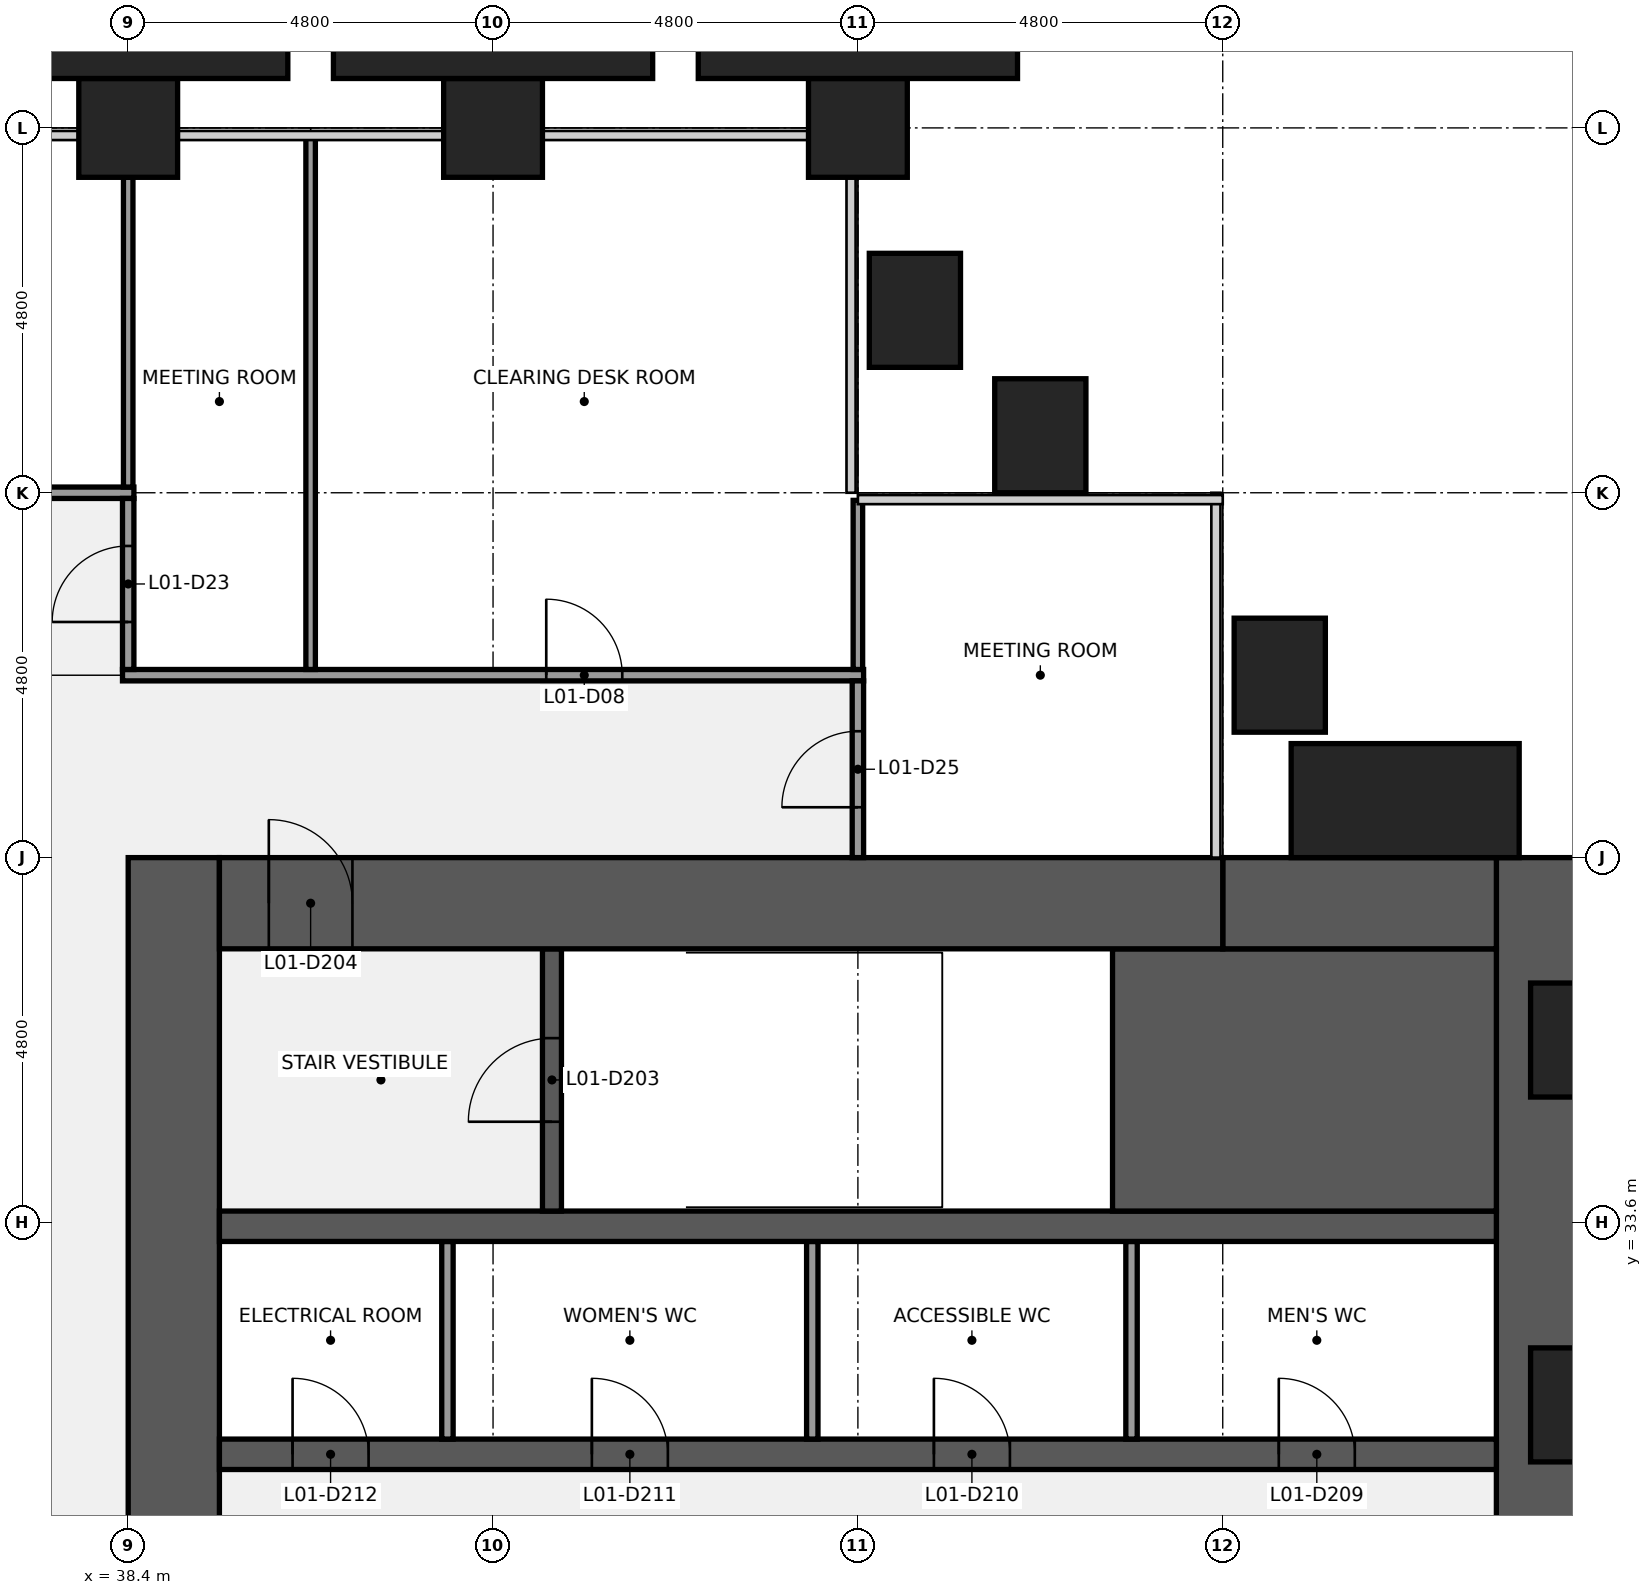
"""IFC4 building model, lengths in metres.
Left out: names, types, materials, properties, quantities, classifications, styles, units other than length and angle.
Written with IfcOpenShell. Run it as: python <this file> out.ifc"""

import sys

from ifc_helpers import new_model, si_unit, direction, frame, frame_2d, origin, origin_2d, place, context, subcontext, project, spatial, rectangle, extrude, element, fill, save


model = new_model("IFC4")
c1 = context("Model", 3, precision=1e-05, world=origin(), true_north=direction((0.0, 1.0)))
c2 = subcontext(c1, "Body", "Model", "MODEL_VIEW")
j1 = project(units=[si_unit("LENGTHUNIT", "METRE"), si_unit("PLANEANGLEUNIT", "RADIAN")], contexts=[c1])
p1 = place(None, origin())
s1 = spatial("IfcSite", under=j1, at=p1, CompositionType="ELEMENT")
p2 = place(p1, origin())
s2 = spatial("IfcBuilding", under=s1, at=p2, CompositionType="ELEMENT")
p3 = place(p2, frame((0.0, 0.0, 12.6)))
s3 = spatial("IfcBuildingStorey", under=s2, at=p3, CompositionType="ELEMENT", Elevation=12.6)
for number, where, z_axis, x_axis in (
    (1, (38.4, 48.0, 0.0), (0.0, 0.0, 1.0), (1.0, 0.0, 0.0)),
    (2, (43.2, 48.0, 0.0), (0.0, 0.0, 1.0), (1.0, 0.0, 0.0)),
    (3, (48.0, 48.0, 0.0), (0.0, 0.0, 1.0), (1.0, 0.0, 0.0)),
):
    element("IfcColumn", number, at=place(p3, frame(where, z_axis=z_axis, x_axis=x_axis)), inside=s3, PredefinedType="COLUMN", context=c2, shape_type="SweptSolid", body=[
        extrude(rectangle(XDim=1.3, YDim=1.3, at=origin_2d()), origin(), (0.0, 0.0, 1.0), 4.4),
    ])
p4 = place(p3, frame((57.0, 38.4, 0.0), z_axis=(0.0, 0.0, 1.0), x_axis=(0.0, -1.0, 0.0)))
e4 = element("IfcWall", 4, at=p4, inside=s3, PredefinedType="SHEAR", context=c2, shape_type="SweptSolid", body=[
    extrude(rectangle(XDim=28.8, YDim=1.2, at=frame_2d((14.4, 0.0))), origin(), (0.0, 0.0, 1.0), 4.24),
])
p5 = place(p4, frame((18.45, 0.0, 0.9)))
e5 = element("IfcOpeningElement", 5, at=p5, cuts=e4, PredefinedType="OPENING", context=c2, shape_type="SweptSolid", body=[
    extrude(rectangle(XDim=1.5, YDim=1.5, at=frame_2d((0.75, 0.75))), frame((0.0, 0.61, 0.0), z_axis=(0.0, -1.0, 0.0), x_axis=(1.0, 0.0, 0.0)), (0.0, 0.0, 1.0), 1.22),
])
p6 = place(p4, frame((8.85, 0.0, 0.9)))
e6 = element("IfcOpeningElement", 6, at=p6, cuts=e4, PredefinedType="OPENING", context=c2, shape_type="SweptSolid", body=[
    extrude(rectangle(XDim=1.5, YDim=1.5, at=frame_2d((0.75, 0.75))), frame((0.0, 0.61, 0.0), z_axis=(0.0, -1.0, 0.0), x_axis=(1.0, 0.0, 0.0)), (0.0, 0.0, 1.0), 1.22),
])
p7 = place(p3, frame((39.0, 9.6, 0.0), z_axis=(0.0, 0.0, 1.0), x_axis=(0.0, 1.0, 0.0)))
e7 = element("IfcWall", 7, at=p7, inside=s3, PredefinedType="SHEAR", context=c2, shape_type="SweptSolid", body=[
    extrude(rectangle(XDim=28.8, YDim=1.2, at=frame_2d((14.4, 0.0))), origin(), (0.0, 0.0, 1.0), 4.24),
])
p8 = place(p7, frame((8.7, 0.0, 0.0)))
e8 = element("IfcOpeningElement", 8, at=p8, cuts=e7, PredefinedType="OPENING", context=c2, shape_type="SweptSolid", body=[
    extrude(rectangle(XDim=1.8, YDim=2.1, at=frame_2d((0.9, 1.05))), frame((0.0, 0.61, 0.0), z_axis=(0.0, -1.0, 0.0), x_axis=(1.0, 0.0, 0.0)), (0.0, 0.0, 1.0), 1.22),
])
p9 = place(p7, frame((18.3, 0.0, 0.0)))
e9 = element("IfcOpeningElement", 9, at=p9, cuts=e7, PredefinedType="OPENING", context=c2, shape_type="SweptSolid", body=[
    extrude(rectangle(XDim=1.8, YDim=2.1, at=frame_2d((0.9, 1.05))), frame((0.0, 0.61, 0.0), z_axis=(0.0, -1.0, 0.0), x_axis=(1.0, 0.0, 0.0)), (0.0, 0.0, 1.0), 1.22),
])
p10 = place(p3, frame((39.6, 30.55, 0.0), z_axis=(0.0, 0.0, 1.0), x_axis=(1.0, 0.0, 0.0)))
e10 = element("IfcWall", 10, at=p10, inside=s3, PredefinedType="SHEAR", context=c2, shape_type="SweptSolid", body=[
    extrude(rectangle(XDim=16.8, YDim=0.4, at=frame_2d((8.4, 0.0))), origin(), (0.0, 0.0, 1.0), 4.24),
])
p11 = place(p10, frame((13.938, 0.0, 0.0)))
e11 = element("IfcOpeningElement", 11, at=p11, cuts=e10, PredefinedType="OPENING", context=c2, shape_type="SweptSolid", body=[
    extrude(rectangle(XDim=1.0, YDim=2.1, at=frame_2d((0.5, 1.05))), frame((0.0, 0.21, 0.0), z_axis=(0.0, -1.0, 0.0), x_axis=(1.0, 0.0, 0.0)), (0.0, 0.0, 1.0), 0.42),
])
p12 = place(p10, frame((9.4, 0.0, 0.0)))
e12 = element("IfcOpeningElement", 12, at=p12, cuts=e10, PredefinedType="OPENING", context=c2, shape_type="SweptSolid", body=[
    extrude(rectangle(XDim=1.0, YDim=2.1, at=frame_2d((0.5, 1.05))), frame((0.0, 0.21, 0.0), z_axis=(0.0, -1.0, 0.0), x_axis=(1.0, 0.0, 0.0)), (0.0, 0.0, 1.0), 0.42),
])
p13 = place(p10, frame((4.9, 0.0, 0.0)))
e13 = element("IfcOpeningElement", 13, at=p13, cuts=e10, PredefinedType="OPENING", context=c2, shape_type="SweptSolid", body=[
    extrude(rectangle(XDim=1.0, YDim=2.1, at=frame_2d((0.5, 1.05))), frame((0.0, 0.21, 0.0), z_axis=(0.0, -1.0, 0.0), x_axis=(1.0, 0.0, 0.0)), (0.0, 0.0, 1.0), 0.42),
])
p14 = place(p10, frame((0.962, 0.0, 0.0)))
e14 = element("IfcOpeningElement", 14, at=p14, cuts=e10, PredefinedType="OPENING", context=c2, shape_type="SweptSolid", body=[
    extrude(rectangle(XDim=1.0, YDim=2.1, at=frame_2d((0.5, 1.05))), frame((0.0, 0.21, 0.0), z_axis=(0.0, -1.0, 0.0), x_axis=(1.0, 0.0, 0.0)), (0.0, 0.0, 1.0), 0.42),
])
for number, where, z_axis, x_axis in (
    (15, (51.6, 30.75, 0.0), (0.0, 0.0, 1.0), (0.0, 1.0, 0.0)),
    (16, (47.4, 30.75, 0.0), (0.0, 0.0, 1.0), (0.0, 1.0, 0.0)),
    (17, (42.6, 30.75, 0.0), (0.0, 0.0, 1.0), (0.0, 1.0, 0.0)),
):
    element("IfcWall", number, at=place(p3, frame(where, z_axis=z_axis, x_axis=x_axis)), inside=s3, PredefinedType="PARTITIONING", context=c2, shape_type="SweptSolid", body=[
        extrude(rectangle(XDim=2.6, YDim=0.15, at=frame_2d((1.3, 0.0))), origin(), (0.0, 0.0, 1.0), 4.24),
    ])
p15 = place(p3, frame((39.6, 33.55, 0.0), z_axis=(0.0, 0.0, 1.0), x_axis=(1.0, 0.0, 0.0)))
e18 = element("IfcWall", 18, at=p15, inside=s3, PredefinedType="SHEAR", context=c2, shape_type="SweptSolid", body=[
    extrude(rectangle(XDim=16.8, YDim=0.4, at=frame_2d((8.4, 0.0))), origin(), (0.0, 0.0, 1.0), 4.24),
])
p16 = place(p3, frame((51.35, 35.475, 0.0), z_axis=(0.0, 0.0, 1.0), x_axis=(1.0, 0.0, 0.0)))
e19 = element("IfcWall", 19, at=p16, inside=s3, PredefinedType="SHEAR", context=c2, shape_type="SweptSolid", body=[
    extrude(rectangle(XDim=5.05, YDim=3.45, at=frame_2d((2.525, 0.0))), origin(), (0.0, 0.0, 1.0), 4.24),
])
p17 = place(p3, frame((43.975, 33.75, 0.0), z_axis=(0.0, 0.0, 1.0), x_axis=(0.0, 1.0, 0.0)))
e20 = element("IfcWall", 20, at=p17, inside=s3, PredefinedType="SHEAR", context=c2, shape_type="SweptSolid", body=[
    extrude(rectangle(XDim=3.45, YDim=0.25, at=frame_2d((1.725, 0.0))), origin(), (0.0, 0.0, 1.0), 4.24),
])
p18 = place(p17, frame((1.175, 0.0, 0.0)))
e21 = element("IfcOpeningElement", 21, at=p18, cuts=e20, PredefinedType="OPENING", context=c2, shape_type="SweptSolid", body=[
    extrude(rectangle(XDim=1.1, YDim=2.1, at=frame_2d((0.55, 1.05))), frame((0.0, 0.135, 0.0), z_axis=(0.0, -1.0, 0.0), x_axis=(1.0, 0.0, 0.0)), (0.0, 0.0, 1.0), 0.27),
])
p19 = place(p3, frame((52.8, 37.8, 0.0), z_axis=(0.0, 0.0, 1.0), x_axis=(1.0, 0.0, 0.0)))
e22 = element("IfcWall", 22, at=p19, inside=s3, PredefinedType="SHEAR", context=c2, shape_type="SweptSolid", body=[
    extrude(rectangle(XDim=3.6, YDim=1.2, at=frame_2d((1.8, 0.0))), origin(), (0.0, 0.0, 1.0), 4.24),
])
p20 = place(p3, frame((39.6, 37.8, 0.0), z_axis=(0.0, 0.0, 1.0), x_axis=(1.0, 0.0, 0.0)))
e23 = element("IfcWall", 23, at=p20, inside=s3, PredefinedType="SHEAR", context=c2, shape_type="SweptSolid", body=[
    extrude(rectangle(XDim=13.2, YDim=1.2, at=frame_2d((6.6, 0.0))), origin(), (0.0, 0.0, 1.0), 4.24),
])
p21 = place(p20, frame((0.65, 0.0, 0.0)))
e24 = element("IfcOpeningElement", 24, at=p21, cuts=e23, PredefinedType="OPENING", context=c2, shape_type="SweptSolid", body=[
    extrude(rectangle(XDim=1.1, YDim=2.1, at=frame_2d((0.55, 1.05))), frame((0.0, 0.61, 0.0), z_axis=(0.0, -1.0, 0.0), x_axis=(1.0, 0.0, 0.0)), (0.0, 0.0, 1.0), 1.22),
])
p22 = place(p3, frame((38.325, 40.8, 0.0), z_axis=(0.0, 0.0, 1.0), x_axis=(1.0, 0.0, 0.0)))
e25 = element("IfcWall", 25, at=p22, inside=s3, PredefinedType="PARTITIONING", context=c2, shape_type="SweptSolid", body=[
    extrude(rectangle(XDim=9.75, YDim=0.15, at=frame_2d((4.875, 0.0))), origin(), (0.0, 0.0, 1.0), 3.27),
])
p23 = place(p22, frame((5.575, 0.0, 0.0)))
e26 = element("IfcOpeningElement", 26, at=p23, cuts=e25, PredefinedType="OPENING", context=c2, shape_type="SweptSolid", body=[
    extrude(rectangle(XDim=1.0, YDim=2.1, at=frame_2d((0.5, 1.05))), frame((0.0, 0.085, 0.0), z_axis=(0.0, -1.0, 0.0), x_axis=(1.0, 0.0, 0.0)), (0.0, 0.0, 1.0), 0.17),
])
p24 = place(p3, frame((19.125, 43.2, 0.0), z_axis=(0.0, 0.0, 1.0), x_axis=(1.0, 0.0, 0.0)))
e27 = element("IfcWall", 27, at=p24, inside=s3, PredefinedType="PARTITIONING", context=c2, shape_type="SweptSolid", body=[
    extrude(rectangle(XDim=19.35, YDim=0.15, at=frame_2d((9.675, 0.0))), origin(), (0.0, 0.0, 1.0), 3.27),
])
p25 = place(p24, frame((1.975, 0.0, 0.0)))
e28 = element("IfcOpeningElement", 28, at=p25, cuts=e27, PredefinedType="OPENING", context=c2, shape_type="SweptSolid", body=[
    extrude(rectangle(XDim=1.0, YDim=2.1, at=frame_2d((0.5, 1.05))), frame((0.0, 0.085, 0.0), z_axis=(0.0, -1.0, 0.0), x_axis=(1.0, 0.0, 0.0)), (0.0, 0.0, 1.0), 0.17),
])
p26 = place(p24, frame((6.775, 0.0, 0.0)))
e29 = element("IfcOpeningElement", 29, at=p26, cuts=e27, PredefinedType="OPENING", context=c2, shape_type="SweptSolid", body=[
    extrude(rectangle(XDim=1.0, YDim=2.1, at=frame_2d((0.5, 1.05))), frame((0.0, 0.085, 0.0), z_axis=(0.0, -1.0, 0.0), x_axis=(1.0, 0.0, 0.0)), (0.0, 0.0, 1.0), 0.17),
])
p27 = place(p24, frame((13.975, 0.0, 0.0)))
e30 = element("IfcOpeningElement", 30, at=p27, cuts=e27, PredefinedType="OPENING", context=c2, shape_type="SweptSolid", body=[
    extrude(rectangle(XDim=1.0, YDim=2.1, at=frame_2d((0.5, 1.05))), frame((0.0, 0.085, 0.0), z_axis=(0.0, -1.0, 0.0), x_axis=(1.0, 0.0, 0.0)), (0.0, 0.0, 1.0), 0.17),
])
p28 = place(p3, frame((38.4, 43.275, 0.0), z_axis=(0.0, 0.0, 1.0), x_axis=(0.0, 1.0, 0.0)))
e31 = element("IfcWall", 31, at=p28, inside=s3, PredefinedType="PARTITIONING", context=c2, shape_type="SweptSolid", body=[
    extrude(rectangle(XDim=4.075, YDim=0.125, at=frame_2d((2.038, 0.0))), origin(), (0.0, 0.0, 1.0), 3.27),
])
p29 = place(p3, frame((38.4, 40.875, 0.0), z_axis=(0.0, 0.0, 1.0), x_axis=(0.0, 1.0, 0.0)))
e32 = element("IfcWall", 32, at=p29, inside=s3, PredefinedType="PARTITIONING", context=c2, shape_type="SweptSolid", body=[
    extrude(rectangle(XDim=2.25, YDim=0.15, at=frame_2d((1.125, 0.0))), origin(), (0.0, 0.0, 1.0), 3.27),
])
p30 = place(p29, frame((0.625, 0.0, 0.0)))
e33 = element("IfcOpeningElement", 33, at=p30, cuts=e32, PredefinedType="OPENING", context=c2, shape_type="SweptSolid", body=[
    extrude(rectangle(XDim=1.0, YDim=2.1, at=frame_2d((0.5, 1.05))), frame((0.0, 0.085, 0.0), z_axis=(0.0, -1.0, 0.0), x_axis=(1.0, 0.0, 0.0)), (0.0, 0.0, 1.0), 0.17),
])
p31 = place(p3, frame((40.8, 40.875, 0.0), z_axis=(0.0, 0.0, 1.0), x_axis=(0.0, 1.0, 0.0)))
e34 = element("IfcWall", 34, at=p31, inside=s3, PredefinedType="PARTITIONING", context=c2, shape_type="SweptSolid", body=[
    extrude(rectangle(XDim=7.025, YDim=0.125, at=frame_2d((3.512, 0.0))), origin(), (0.0, 0.0, 1.0), 3.27),
])
p32 = place(p3, frame((48.0, 40.875, 0.0), z_axis=(0.0, 0.0, 1.0), x_axis=(0.0, 1.0, 0.0)))
e35 = element("IfcWall", 35, at=p32, inside=s3, PredefinedType="PARTITIONING", context=c2, shape_type="SweptSolid", body=[
    extrude(rectangle(XDim=2.225, YDim=0.125, at=frame_2d((1.113, 0.0))), origin(), (0.0, 0.0, 1.0), 3.27),
])
p33 = place(p3, frame((48.0, 38.4, 0.0), z_axis=(0.0, 0.0, 1.0), x_axis=(0.0, 1.0, 0.0)))
e36 = element("IfcWall", 36, at=p33, inside=s3, PredefinedType="PARTITIONING", context=c2, shape_type="SweptSolid", body=[
    extrude(rectangle(XDim=2.325, YDim=0.15, at=frame_2d((1.163, 0.0))), origin(), (0.0, 0.0, 1.0), 3.27),
])
p34 = place(p33, frame((0.663, 0.0, 0.0)))
e37 = element("IfcOpeningElement", 37, at=p34, cuts=e36, PredefinedType="OPENING", context=c2, shape_type="SweptSolid", body=[
    extrude(rectangle(XDim=1.0, YDim=2.1, at=frame_2d((0.5, 1.05))), frame((0.0, 0.085, 0.0), z_axis=(0.0, -1.0, 0.0), x_axis=(1.0, 0.0, 0.0)), (0.0, 0.0, 1.0), 0.17),
])
for number, where, z_axis, x_axis in (
    (38, (53.55, 40.8, 0.0), (0.0, 0.0, 1.0), (0.0, 1.0, 0.0)),
    (39, (50.4, 43.95, 0.0), (0.0, 0.0, 1.0), (1.0, 0.0, 0.0)),
    (40, (48.75, 45.6, 0.0), (0.0, 0.0, 1.0), (0.0, 1.0, 0.0)),
):
    element("IfcColumn", number, at=place(p3, frame(where, z_axis=z_axis, x_axis=x_axis)), inside=s3, PredefinedType="PILASTER", context=c2, shape_type="SweptSolid", body=[
        extrude(rectangle(XDim=1.2, YDim=1.5, at=origin_2d()), origin(), (0.0, 0.0, 1.0), 4.4),
    ])
p35 = place(p3, frame((55.2, 39.15, 0.0), z_axis=(0.0, 0.0, 1.0), x_axis=(1.0, 0.0, 0.0)))
e41 = element("IfcColumn", 41, at=p35, inside=s3, PredefinedType="PILASTER", context=c2, shape_type="SweptSolid", body=[
    extrude(rectangle(XDim=3.0, YDim=1.5, at=origin_2d()), origin(), (0.0, 0.0, 1.0), 4.4),
])
for number, where, z_axis, x_axis in (
    (42, (38.4, 49.075, 0.0), (0.0, 0.0, 1.0), (1.0, 0.0, 0.0)),
    (43, (43.2, 49.075, 0.0), (0.0, 0.0, 1.0), (1.0, 0.0, 0.0)),
    (44, (48.0, 49.075, 0.0), (0.0, 0.0, 1.0), (1.0, 0.0, 0.0)),
):
    element("IfcColumn", number, at=place(p3, frame(where, z_axis=z_axis, x_axis=x_axis)), inside=s3, PredefinedType="PILASTER", context=c2, shape_type="SweptSolid", body=[
        extrude(rectangle(XDim=4.2, YDim=0.85, at=origin_2d()), origin(), (0.0, 0.0, 1.0), 4.4),
    ])
p36 = place(p18, origin())
e45 = element("IfcDoor", 45, at=p36, inside=s3, OperationType="SINGLE_SWING_LEFT", PredefinedType="DOOR", context=c2, shape_type="SweptSolid", body=[
    extrude(rectangle(XDim=1.1, YDim=2.1, at=frame_2d((0.55, 1.05))), frame((0.0, 0.025, 0.0), z_axis=(0.0, -1.0, 0.0), x_axis=(1.0, 0.0, 0.0)), (0.0, 0.0, 1.0), 0.05),
])
fill(e21, e45)
p37 = place(p21, origin())
e46 = element("IfcDoor", 46, at=p37, inside=s3, OperationType="SINGLE_SWING_LEFT", PredefinedType="DOOR", context=c2, shape_type="SweptSolid", body=[
    extrude(rectangle(XDim=1.1, YDim=2.1, at=frame_2d((0.55, 1.05))), frame((0.0, 0.025, 0.0), z_axis=(0.0, -1.0, 0.0), x_axis=(1.0, 0.0, 0.0)), (0.0, 0.0, 1.0), 0.05),
])
fill(e24, e46)
p38 = place(p11, origin())
e47 = element("IfcDoor", 47, at=p38, inside=s3, OperationType="SINGLE_SWING_LEFT", PredefinedType="DOOR", context=c2, shape_type="SweptSolid", body=[
    extrude(rectangle(XDim=1.0, YDim=2.1, at=frame_2d((0.5, 1.05))), frame((0.0, 0.025, 0.0), z_axis=(0.0, -1.0, 0.0), x_axis=(1.0, 0.0, 0.0)), (0.0, 0.0, 1.0), 0.05),
])
fill(e11, e47)
p39 = place(p12, origin())
e48 = element("IfcDoor", 48, at=p39, inside=s3, OperationType="SINGLE_SWING_LEFT", PredefinedType="DOOR", context=c2, shape_type="SweptSolid", body=[
    extrude(rectangle(XDim=1.0, YDim=2.1, at=frame_2d((0.5, 1.05))), frame((0.0, 0.025, 0.0), z_axis=(0.0, -1.0, 0.0), x_axis=(1.0, 0.0, 0.0)), (0.0, 0.0, 1.0), 0.05),
])
fill(e12, e48)
p40 = place(p13, origin())
e49 = element("IfcDoor", 49, at=p40, inside=s3, OperationType="SINGLE_SWING_LEFT", PredefinedType="DOOR", context=c2, shape_type="SweptSolid", body=[
    extrude(rectangle(XDim=1.0, YDim=2.1, at=frame_2d((0.5, 1.05))), frame((0.0, 0.025, 0.0), z_axis=(0.0, -1.0, 0.0), x_axis=(1.0, 0.0, 0.0)), (0.0, 0.0, 1.0), 0.05),
])
fill(e13, e49)
p41 = place(p14, origin())
e50 = element("IfcDoor", 50, at=p41, inside=s3, OperationType="SINGLE_SWING_LEFT", PredefinedType="DOOR", context=c2, shape_type="SweptSolid", body=[
    extrude(rectangle(XDim=1.0, YDim=2.1, at=frame_2d((0.5, 1.05))), frame((0.0, 0.025, 0.0), z_axis=(0.0, -1.0, 0.0), x_axis=(1.0, 0.0, 0.0)), (0.0, 0.0, 1.0), 0.05),
])
fill(e14, e50)
p42 = place(p23, origin())
e51 = element("IfcDoor", 51, at=p42, inside=s3, OperationType="SINGLE_SWING_LEFT", PredefinedType="DOOR", context=c2, shape_type="SweptSolid", body=[
    extrude(rectangle(XDim=1.0, YDim=2.1, at=frame_2d((0.5, 1.05))), frame((0.0, 0.025, 0.0), z_axis=(0.0, -1.0, 0.0), x_axis=(1.0, 0.0, 0.0)), (0.0, 0.0, 1.0), 0.05),
])
fill(e26, e51)
p43 = place(p30, origin())
e52 = element("IfcDoor", 52, at=p43, inside=s3, OperationType="SINGLE_SWING_LEFT", PredefinedType="DOOR", context=c2, shape_type="SweptSolid", body=[
    extrude(rectangle(XDim=1.0, YDim=2.1, at=frame_2d((0.5, 1.05))), frame((0.0, 0.025, 0.0), z_axis=(0.0, -1.0, 0.0), x_axis=(1.0, 0.0, 0.0)), (0.0, 0.0, 1.0), 0.05),
])
fill(e33, e52)
p44 = place(p34, origin())
e53 = element("IfcDoor", 53, at=p44, inside=s3, OperationType="SINGLE_SWING_LEFT", PredefinedType="DOOR", context=c2, shape_type="SweptSolid", body=[
    extrude(rectangle(XDim=1.0, YDim=2.1, at=frame_2d((0.5, 1.05))), frame((0.0, 0.025, 0.0), z_axis=(0.0, -1.0, 0.0), x_axis=(1.0, 0.0, 0.0)), (0.0, 0.0, 1.0), 0.05),
])
fill(e37, e53)
save(model, sys.argv[1])
